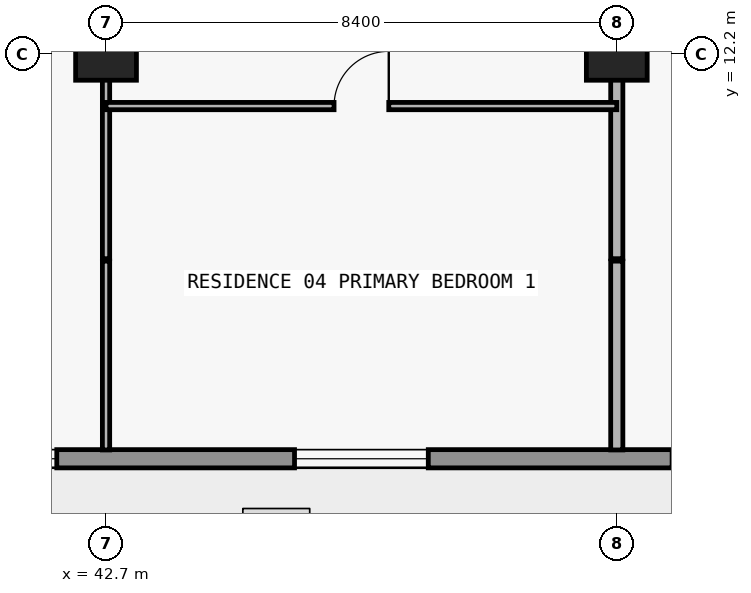
"""IFC4 building model, lengths in metres.
Left out: names, types, materials, properties, quantities, classifications, styles, units other than length and angle.
Written with IfcOpenShell. Run it as: python <this file> out.ifc"""

import sys

from ifc_helpers import new_model, si_unit, direction, frame, frame_2d, origin, origin_2d, place, context, subcontext, project, spatial, rectangle, extrude, element, fill, save


model = new_model("IFC4")
c1 = context("Model", 3, precision=1e-05, world=origin(), true_north=direction((0.0, 1.0)))
c2 = subcontext(c1, "Body", "Model", "MODEL_VIEW")
j1 = project(units=[si_unit("LENGTHUNIT", "METRE"), si_unit("PLANEANGLEUNIT", "RADIAN")], contexts=[c1])
p1 = place(None, origin())
s1 = spatial("IfcSite", under=j1, at=p1, CompositionType="ELEMENT")
p2 = place(p1, origin())
s2 = spatial("IfcBuilding", under=s1, at=p2, CompositionType="ELEMENT")
p3 = place(p2, frame((0.0, 0.0, 145.5)))
s3 = spatial("IfcBuildingStorey", under=s2, at=p3, CompositionType="ELEMENT", Elevation=145.5)
for number, where, z_axis, x_axis in (
    (1, (42.7, 12.2, 0.0), (0.0, 0.0, 1.0), (1.0, 0.0, 0.0)),
    (2, (51.1, 12.2, 0.0), (0.0, 0.0, 1.0), (1.0, 0.0, 0.0)),
):
    element("IfcColumn", number, at=place(p3, frame(where, z_axis=z_axis, x_axis=x_axis)), inside=s3, PredefinedType="COLUMN", context=c2, shape_type="SweptSolid", body=[
        extrude(rectangle(XDim=1.0, YDim=0.85, at=origin_2d()), origin(), (0.0, 0.0, 1.0), 3.05),
    ])
p4 = place(p3, frame((70.1, 5.55, 0.0), z_axis=(0.0, 0.0, 1.0), x_axis=(-1.0, 0.0, 0.0)))
e3 = element("IfcWall", 3, at=p4, inside=s3, PredefinedType="STANDARD", context=c2, shape_type="SweptSolid", body=[
    extrude(rectangle(XDim=62.4, YDim=0.3, at=frame_2d((31.2, 0.0))), origin(), (0.0, 0.0, 1.0), 3.05),
])
p5 = place(p4, frame((57.226, 0.0, 0.0)))
e4 = element("IfcOpeningElement", 4, at=p5, cuts=e3, PredefinedType="OPENING", context=c2, shape_type="SweptSolid", body=[
    extrude(rectangle(XDim=2.0, YDim=2.3, at=frame_2d((1.0, 1.15))), frame((0.0, 0.16, 0.0), z_axis=(0.0, -1.0, 0.0), x_axis=(1.0, 0.0, 0.0)), (0.0, 0.0, 1.0), 0.32),
])
p6 = place(p4, frame((52.926, 0.0, 0.85)))
e5 = element("IfcOpeningElement", 5, at=p6, cuts=e3, PredefinedType="OPENING", context=c2, shape_type="SweptSolid", body=[
    extrude(rectangle(XDim=2.2, YDim=1.55, at=frame_2d((1.1, 0.775))), frame((0.0, 0.16, 0.0), z_axis=(0.0, -1.0, 0.0), x_axis=(1.0, 0.0, 0.0)), (0.0, 0.0, 1.0), 0.32),
])
p7 = place(p4, frame((48.49, 0.0, 0.0)))
e6 = element("IfcOpeningElement", 6, at=p7, cuts=e3, PredefinedType="OPENING", context=c2, shape_type="SweptSolid", body=[
    extrude(rectangle(XDim=2.0, YDim=2.3, at=frame_2d((1.0, 1.15))), frame((0.0, 0.16, 0.0), z_axis=(0.0, -1.0, 0.0), x_axis=(1.0, 0.0, 0.0)), (0.0, 0.0, 1.0), 0.32),
])
p8 = place(p4, frame((44.39, 0.0, 0.85)))
e7 = element("IfcOpeningElement", 7, at=p8, cuts=e3, PredefinedType="OPENING", context=c2, shape_type="SweptSolid", body=[
    extrude(rectangle(XDim=1.8, YDim=1.55, at=frame_2d((0.9, 0.775))), frame((0.0, 0.16, 0.0), z_axis=(0.0, -1.0, 0.0), x_axis=(1.0, 0.0, 0.0)), (0.0, 0.0, 1.0), 0.32),
])
p9 = place(p4, frame((40.426, 0.0, 0.0)))
e8 = element("IfcOpeningElement", 8, at=p9, cuts=e3, PredefinedType="OPENING", context=c2, shape_type="SweptSolid", body=[
    extrude(rectangle(XDim=2.0, YDim=2.3, at=frame_2d((1.0, 1.15))), frame((0.0, 0.16, 0.0), z_axis=(0.0, -1.0, 0.0), x_axis=(1.0, 0.0, 0.0)), (0.0, 0.0, 1.0), 0.32),
])
p10 = place(p4, frame((36.126, 0.0, 0.85)))
e9 = element("IfcOpeningElement", 9, at=p10, cuts=e3, PredefinedType="OPENING", context=c2, shape_type="SweptSolid", body=[
    extrude(rectangle(XDim=2.2, YDim=1.55, at=frame_2d((1.1, 0.775))), frame((0.0, 0.16, 0.0), z_axis=(0.0, -1.0, 0.0), x_axis=(1.0, 0.0, 0.0)), (0.0, 0.0, 1.0), 0.32),
])
p11 = place(p4, frame((32.09, 0.0, 0.0)))
e10 = element("IfcOpeningElement", 10, at=p11, cuts=e3, PredefinedType="OPENING", context=c2, shape_type="SweptSolid", body=[
    extrude(rectangle(XDim=2.0, YDim=2.3, at=frame_2d((1.0, 1.15))), frame((0.0, 0.16, 0.0), z_axis=(0.0, -1.0, 0.0), x_axis=(1.0, 0.0, 0.0)), (0.0, 0.0, 1.0), 0.32),
])
p12 = place(p4, frame((28.21, 0.0, 0.65)))
e11 = element("IfcOpeningElement", 11, at=p12, cuts=e3, PredefinedType="OPENING", context=c2, shape_type="SweptSolid", body=[
    extrude(rectangle(XDim=2.6, YDim=1.85, at=frame_2d((1.3, 0.925))), frame((0.0, 0.16, 0.0), z_axis=(0.0, -1.0, 0.0), x_axis=(1.0, 0.0, 0.0)), (0.0, 0.0, 1.0), 0.32),
])
p13 = place(p4, frame((22.1, 0.0, 0.85)))
e12 = element("IfcOpeningElement", 12, at=p13, cuts=e3, PredefinedType="OPENING", context=c2, shape_type="SweptSolid", body=[
    extrude(rectangle(XDim=2.2, YDim=1.55, at=frame_2d((1.1, 0.775))), frame((0.0, 0.16, 0.0), z_axis=(0.0, -1.0, 0.0), x_axis=(1.0, 0.0, 0.0)), (0.0, 0.0, 1.0), 0.32),
])
p14 = place(p4, frame((16.09, 0.0, 0.0)))
e13 = element("IfcOpeningElement", 13, at=p14, cuts=e3, PredefinedType="OPENING", context=c2, shape_type="SweptSolid", body=[
    extrude(rectangle(XDim=2.0, YDim=2.3, at=frame_2d((1.0, 1.15))), frame((0.0, 0.16, 0.0), z_axis=(0.0, -1.0, 0.0), x_axis=(1.0, 0.0, 0.0)), (0.0, 0.0, 1.0), 0.32),
])
p15 = place(p4, frame((11.41, 0.0, 0.65)))
e14 = element("IfcOpeningElement", 14, at=p15, cuts=e3, PredefinedType="OPENING", context=c2, shape_type="SweptSolid", body=[
    extrude(rectangle(XDim=2.6, YDim=1.85, at=frame_2d((1.3, 0.925))), frame((0.0, 0.16, 0.0), z_axis=(0.0, -1.0, 0.0), x_axis=(1.0, 0.0, 0.0)), (0.0, 0.0, 1.0), 0.32),
])
p16 = place(p4, frame((5.3, 0.0, 0.85)))
e15 = element("IfcOpeningElement", 15, at=p16, cuts=e3, PredefinedType="OPENING", context=c2, shape_type="SweptSolid", body=[
    extrude(rectangle(XDim=2.2, YDim=1.55, at=frame_2d((1.1, 0.775))), frame((0.0, 0.16, 0.0), z_axis=(0.0, -1.0, 0.0), x_axis=(1.0, 0.0, 0.0)), (0.0, 0.0, 1.0), 0.32),
])
p17 = place(p3, frame((42.7, 5.695, 0.0), z_axis=(0.0, 0.0, 1.0), x_axis=(0.0, 1.0, 0.0)))
e16 = element("IfcWall", 16, at=p17, inside=s3, PredefinedType="PARTITIONING", context=c2, shape_type="SweptSolid", body=[
    extrude(rectangle(XDim=3.105, YDim=0.12, at=frame_2d((1.552, 0.0))), origin(), (0.0, 0.0, 1.0), 3.05),
])
p18 = place(p3, frame((42.7, 8.84, 0.0), z_axis=(0.0, 0.0, 1.0), x_axis=(0.0, 1.0, 0.0)))
e17 = element("IfcWall", 17, at=p18, inside=s3, PredefinedType="PARTITIONING", context=c2, shape_type="SweptSolid", body=[
    extrude(rectangle(XDim=15.79, YDim=0.12, at=frame_2d((7.895, 0.0))), origin(), (0.0, 0.0, 1.0), 2.174),
])
p19 = place(p3, frame((51.1, 5.695, 0.0), z_axis=(0.0, 0.0, 1.0), x_axis=(0.0, 1.0, 0.0)))
e18 = element("IfcWall", 18, at=p19, inside=s3, PredefinedType="PARTITIONING", context=c2, shape_type="SweptSolid", body=[
    extrude(rectangle(XDim=3.105, YDim=0.2, at=frame_2d((1.552, 0.0))), origin(), (0.0, 0.0, 1.0), 3.05),
])
p20 = place(p3, frame((51.1, 8.84, 0.0), z_axis=(0.0, 0.0, 1.0), x_axis=(0.0, 1.0, 0.0)))
e19 = element("IfcWall", 19, at=p20, inside=s3, PredefinedType="PARTITIONING", context=c2, shape_type="SweptSolid", body=[
    extrude(rectangle(XDim=11.955, YDim=0.2, at=frame_2d((5.978, 0.0))), origin(), (0.0, 0.0, 1.0), 2.174),
])
p21 = place(p3, frame((42.7, 11.35, 0.0), z_axis=(0.0, 0.0, 1.0), x_axis=(1.0, 0.0, 0.0)))
e20 = element("IfcWall", 20, at=p21, inside=s3, PredefinedType="PARTITIONING", context=c2, shape_type="SweptSolid", body=[
    extrude(rectangle(XDim=8.4, YDim=0.12, at=frame_2d((4.2, 0.0))), origin(), (0.0, 0.0, 1.0), 3.05),
])
p22 = place(p21, frame((3.75, 0.0, 0.0)))
e21 = element("IfcOpeningElement", 21, at=p22, cuts=e20, PredefinedType="OPENING", context=c2, shape_type="SweptSolid", body=[
    extrude(rectangle(XDim=0.9, YDim=2.15, at=frame_2d((0.45, 1.075))), frame((0.0, 0.07, 0.0), z_axis=(0.0, -1.0, 0.0), x_axis=(1.0, 0.0, 0.0)), (0.0, 0.0, 1.0), 0.14),
])
p23 = place(p12, origin())
e22 = element("IfcWindow", 22, at=p23, inside=s3, PartitioningType="SINGLE_PANEL", PredefinedType="WINDOW", context=c2, shape_type="SweptSolid", body=[
    extrude(rectangle(XDim=2.6, YDim=1.85, at=frame_2d((1.3, 0.925))), frame((0.0, 0.03, 0.0), z_axis=(0.0, -1.0, 0.0), x_axis=(1.0, 0.0, 0.0)), (0.0, 0.0, 1.0), 0.06),
])
fill(e11, e22)
p24 = place(p13, origin())
e23 = element("IfcWindow", 23, at=p24, inside=s3, PartitioningType="SINGLE_PANEL", PredefinedType="WINDOW", context=c2, shape_type="SweptSolid", body=[
    extrude(rectangle(XDim=2.2, YDim=1.55, at=frame_2d((1.1, 0.775))), frame((0.0, 0.03, 0.0), z_axis=(0.0, -1.0, 0.0), x_axis=(1.0, 0.0, 0.0)), (0.0, 0.0, 1.0), 0.06),
])
fill(e12, e23)
p25 = place(p22, origin())
e24 = element("IfcDoor", 24, at=p25, inside=s3, OperationType="SINGLE_SWING_RIGHT", PredefinedType="DOOR", context=c2, shape_type="SweptSolid", body=[
    extrude(rectangle(XDim=0.9, YDim=2.15, at=frame_2d((0.45, 1.075))), frame((0.0, 0.025, 0.0), z_axis=(0.0, -1.0, 0.0), x_axis=(1.0, 0.0, 0.0)), (0.0, 0.0, 1.0), 0.05),
])
fill(e21, e24)
save(model, sys.argv[1])
